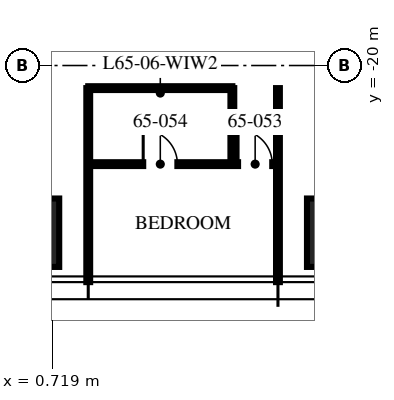
"""IFC4 building model, lengths in metres.
Left out: names, types, materials, properties, quantities, classifications, styles, units other than length and angle.
Written with IfcOpenShell. Run it as: python <this file> out.ifc"""

import sys

from ifc_helpers import new_model, si_unit, direction, frame, frame_2d, origin, origin_2d, place, context, subcontext, project, spatial, rectangle, extrude, element, fill, save


model = new_model("IFC4")
c1 = context("Model", 3, precision=1e-05, world=origin(), true_north=direction((0.0, 1.0)))
c2 = subcontext(c1, "Body", "Model", "MODEL_VIEW")
j1 = project(units=[si_unit("LENGTHUNIT", "METRE"), si_unit("PLANEANGLEUNIT", "RADIAN")], contexts=[c1])
p1 = place(None, origin())
s1 = spatial("IfcSite", under=j1, at=p1, CompositionType="ELEMENT")
p2 = place(p1, origin())
s2 = spatial("IfcBuilding", under=s1, at=p2, CompositionType="ELEMENT")
p3 = place(p2, frame((0.0, 0.0, 259.5)))
s3 = spatial("IfcBuildingStorey", under=s2, at=p3, CompositionType="ELEMENT", Elevation=259.5)
for number, where, z_axis, x_axis in (
    (1, (8.32, -24.4, 0.0), (0.0, 0.0, 1.0), (1.0, 0.0, 0.0)),
    (2, (0.0, -24.4, 0.0), (0.0, 0.0, 1.0), (1.0, 0.0, 0.0)),
):
    element("IfcColumn", number, at=place(p3, frame(where, z_axis=z_axis, x_axis=x_axis)), inside=s3, PredefinedType="COLUMN", context=c2, shape_type="SweptSolid", body=[
        extrude(rectangle(XDim=1.8, YDim=1.8, at=origin_2d()), origin(), (0.0, 0.0, 1.0), 3.75),
    ])
for number, where, z_axis, x_axis in (
    (3, (1.664, -20.595, 0.0), (0.0, 0.0, 1.0), (0.0, -1.0, 0.0)),
    (4, (6.656, -20.595, 0.0), (0.0, 0.0, 1.0), (0.0, -1.0, 0.0)),
):
    element("IfcWall", number, at=place(p3, frame(where, z_axis=z_axis, x_axis=x_axis)), inside=s3, PredefinedType="PARTITIONING", context=c2, shape_type="SweptSolid", body=[
        extrude(rectangle(XDim=5.105, YDim=0.1, at=frame_2d((2.552, 0.0))), origin(), (0.0, 0.0, 1.0), 2.91),
    ])
p4 = place(p3, frame((1.664, -22.595, 0.0), z_axis=(0.0, 0.0, 1.0), x_axis=(1.0, 0.0, 0.0)))
e5 = element("IfcWall", 5, at=p4, inside=s3, PredefinedType="PARTITIONING", context=c2, shape_type="SweptSolid", body=[
    extrude(rectangle(XDim=4.992, YDim=0.1, at=frame_2d((2.496, 0.0))), origin(), (0.0, 0.0, 1.0), 2.81),
])
p5 = place(p4, frame((3.942, 0.0, 0.0)))
e6 = element("IfcOpeningElement", 6, at=p5, cuts=e5, PredefinedType="OPENING", context=c2, shape_type="SweptSolid", body=[
    extrude(rectangle(XDim=0.9, YDim=2.1, at=frame_2d((0.45, 1.05))), frame((0.0, 0.06, 0.0), z_axis=(0.0, -1.0, 0.0), x_axis=(1.0, 0.0, 0.0)), (0.0, 0.0, 1.0), 0.12),
])
p6 = place(p4, frame((1.446, 0.0, 0.0)))
e7 = element("IfcOpeningElement", 7, at=p6, cuts=e5, PredefinedType="OPENING", context=c2, shape_type="SweptSolid", body=[
    extrude(rectangle(XDim=0.9, YDim=2.1, at=frame_2d((0.45, 1.05))), frame((0.0, 0.06, 0.0), z_axis=(0.0, -1.0, 0.0), x_axis=(1.0, 0.0, 0.0)), (0.0, 0.0, 1.0), 0.12),
])
p7 = place(p3, frame((5.456, -20.595, 0.0), z_axis=(0.0, 0.0, 1.0), x_axis=(0.0, -1.0, 0.0)))
e8 = element("IfcWall", 8, at=p7, inside=s3, PredefinedType="PARTITIONING", context=c2, shape_type="SweptSolid", body=[
    extrude(rectangle(XDim=2.0, YDim=0.1, at=frame_2d((1.0, 0.0))), origin(), (0.0, 0.0, 1.0), 3.5),
])
p8 = place(p3, frame((1.664, -20.595, 0.0), z_axis=(0.0, 0.0, 1.0), x_axis=(1.0, 0.0, 0.0)))
e9 = element("IfcWall", 9, at=p8, inside=s3, PredefinedType="PARTITIONING", context=c2, shape_type="SweptSolid", body=[
    extrude(rectangle(XDim=3.792, YDim=0.1, at=frame_2d((1.896, 0.0))), origin(), (0.0, 0.0, 1.0), 2.81),
])
p9 = place(p5, origin())
e10 = element("IfcDoor", 10, at=p9, inside=s3, OperationType="SINGLE_SWING_LEFT", PredefinedType="DOOR", context=c2, shape_type="SweptSolid", body=[
    extrude(rectangle(XDim=0.9, YDim=2.1, at=frame_2d((0.45, 1.05))), frame((0.0, 0.025, 0.0), z_axis=(0.0, -1.0, 0.0), x_axis=(1.0, 0.0, 0.0)), (0.0, 0.0, 1.0), 0.05),
])
fill(e6, e10)
p10 = place(p6, origin())
e11 = element("IfcDoor", 11, at=p10, inside=s3, OperationType="SINGLE_SWING_LEFT", PredefinedType="DOOR", context=c2, shape_type="SweptSolid", body=[
    extrude(rectangle(XDim=0.9, YDim=2.1, at=frame_2d((0.45, 1.05))), frame((0.0, 0.025, 0.0), z_axis=(0.0, -1.0, 0.0), x_axis=(1.0, 0.0, 0.0)), (0.0, 0.0, 1.0), 0.05),
])
fill(e7, e11)
save(model, sys.argv[1])
